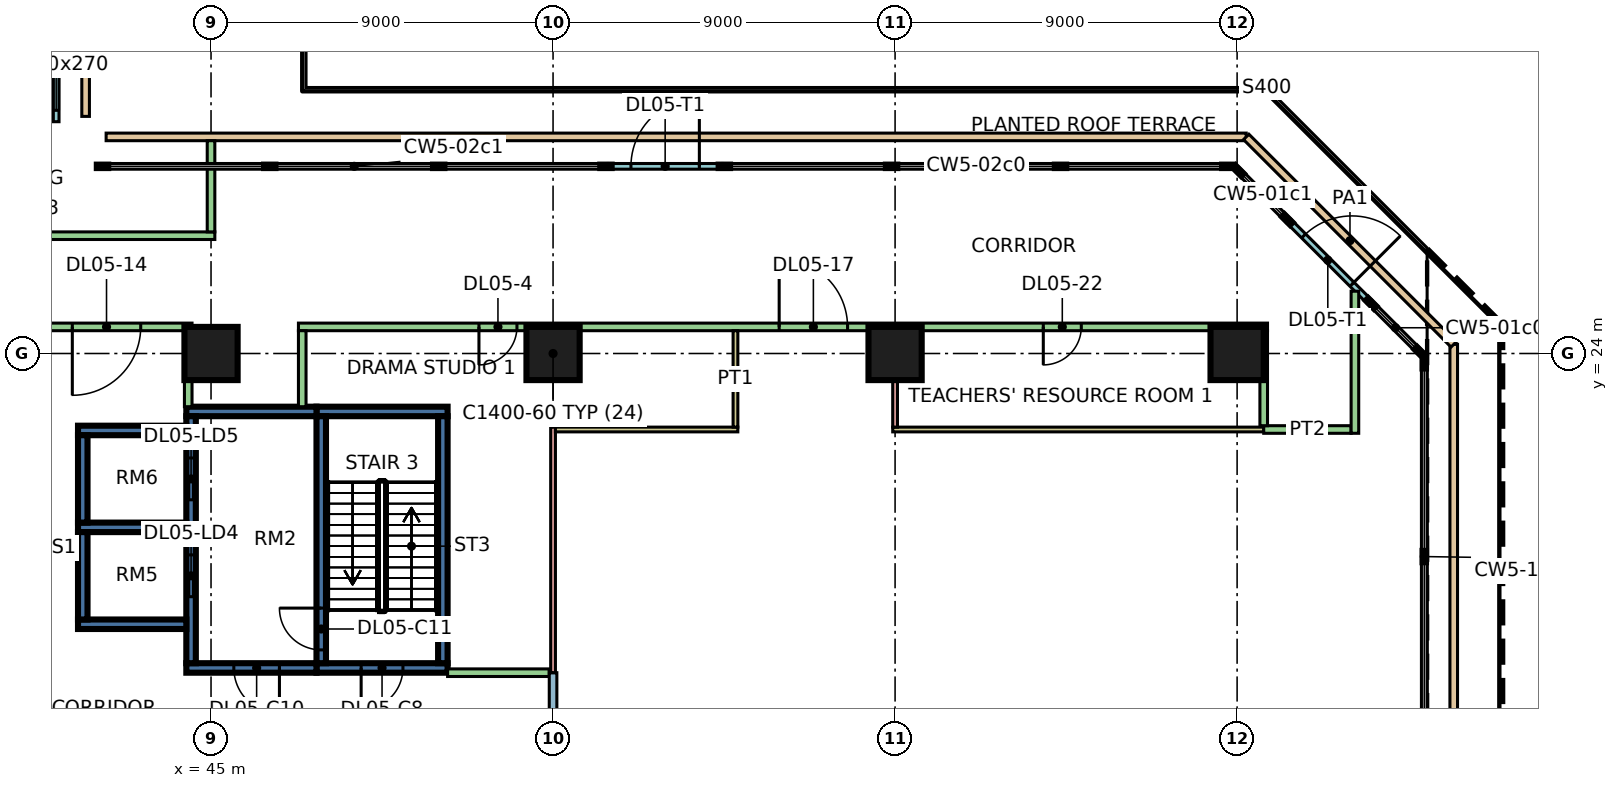
"""IFC4 building model, lengths in metres.
Left out: names, types, materials, properties, quantities, classifications, styles, units other than length and angle.
Written with IfcOpenShell. Run it as: python <this file> out.ifc"""

import sys

from ifc_helpers import new_model, si_unit, direction, frame, frame_2d, origin, origin_2d, place, context, subcontext, project, spatial, rectangle, extrude, element, fill, save


model = new_model("IFC4")
c1 = context("Model", 3, precision=1e-05, world=origin(), true_north=direction((0.0, 1.0)))
c2 = subcontext(c1, "Body", "Model", "MODEL_VIEW")
j1 = project(units=[si_unit("LENGTHUNIT", "METRE"), si_unit("PLANEANGLEUNIT", "RADIAN")], contexts=[c1])
p1 = place(None, origin())
s1 = spatial("IfcSite", under=j1, at=p1, CompositionType="ELEMENT")
p2 = place(p1, origin())
s2 = spatial("IfcBuilding", under=s1, at=p2, CompositionType="ELEMENT")
p3 = place(p2, frame((0.0, 0.0, 26.4)))
s3 = spatial("IfcBuildingStorey", under=s2, at=p3, CompositionType="ELEMENT", Elevation=26.4)
for number, where, z_axis, x_axis in (
    (1, (45.0, 24.0, 0.0), (0.0, 0.0, 1.0), (1.0, 0.0, 0.0)),
    (2, (54.0, 24.0, 0.0), (0.0, 0.0, 1.0), (1.0, 0.0, 0.0)),
    (3, (63.0, 24.0, 0.0), (0.0, 0.0, 1.0), (1.0, 0.0, 0.0)),
    (4, (72.0, 24.0, 0.0), (0.0, 0.0, 1.0), (1.0, 0.0, 0.0)),
):
    element("IfcColumn", number, at=place(p3, frame(where, z_axis=z_axis, x_axis=x_axis)), inside=s3, PredefinedType="COLUMN", context=c2, shape_type="SweptSolid", body=[
        extrude(rectangle(XDim=1.4, YDim=1.4, at=origin_2d()), origin(), (0.0, 0.0, 1.0), 9.0),
    ])
p4 = place(p3, frame((47.775, 15.725, 0.0), z_axis=(0.0, 0.0, 1.0), x_axis=(1.0, 0.0, 0.0)))
e5 = element("IfcWall", 5, at=p4, inside=s3, PredefinedType="SHEAR", context=c2, shape_type="SweptSolid", body=[
    extrude(rectangle(XDim=3.45, YDim=0.25, at=frame_2d((1.725, 0.0))), origin(), (0.0, 0.0, 1.0), 9.0),
])
p5 = place(p4, frame((1.175, 0.0, 0.0)))
e6 = element("IfcOpeningElement", 6, at=p5, cuts=e5, PredefinedType="OPENING", context=c2, shape_type="SweptSolid", body=[
    extrude(rectangle(XDim=1.1, YDim=2.2, at=frame_2d((0.55, 1.1))), frame((0.0, 0.135, 0.0), z_axis=(0.0, -1.0, 0.0), x_axis=(1.0, 0.0, 0.0)), (0.0, 0.0, 1.0), 0.27),
])
p6 = place(p3, frame((47.775, 22.475, 0.0), z_axis=(0.0, 0.0, 1.0), x_axis=(1.0, 0.0, 0.0)))
e7 = element("IfcWall", 7, at=p6, inside=s3, PredefinedType="SHEAR", context=c2, shape_type="SweptSolid", body=[
    extrude(rectangle(XDim=3.45, YDim=0.25, at=frame_2d((1.725, 0.0))), origin(), (0.0, 0.0, 1.0), 9.0),
])
p7 = place(p3, frame((47.9, 15.85, 0.0), z_axis=(0.0, 0.0, 1.0), x_axis=(0.0, 1.0, 0.0)))
e8 = element("IfcWall", 8, at=p7, inside=s3, PredefinedType="SHEAR", context=c2, shape_type="SweptSolid", body=[
    extrude(rectangle(XDim=6.5, YDim=0.25, at=frame_2d((3.25, 0.0))), origin(), (0.0, 0.0, 1.0), 9.0),
])
p8 = place(p7, frame((0.35, 0.0, 0.0)))
e9 = element("IfcOpeningElement", 9, at=p8, cuts=e8, PredefinedType="OPENING", context=c2, shape_type="SweptSolid", body=[
    extrude(rectangle(XDim=1.1, YDim=2.2, at=frame_2d((0.55, 1.1))), frame((0.0, 0.135, 0.0), z_axis=(0.0, -1.0, 0.0), x_axis=(1.0, 0.0, 0.0)), (0.0, 0.0, 1.0), 0.27),
])
p9 = place(p3, frame((51.1, 15.85, 0.0), z_axis=(0.0, 0.0, 1.0), x_axis=(0.0, 1.0, 0.0)))
e10 = element("IfcWall", 10, at=p9, inside=s3, PredefinedType="SHEAR", context=c2, shape_type="SweptSolid", body=[
    extrude(rectangle(XDim=6.5, YDim=0.25, at=frame_2d((3.25, 0.0))), origin(), (0.0, 0.0, 1.0), 9.0),
])
p10 = place(p3, frame((44.35, 15.725, 0.0), z_axis=(0.0, 0.0, 1.0), x_axis=(1.0, 0.0, 0.0)))
e11 = element("IfcWall", 11, at=p10, inside=s3, PredefinedType="SHEAR", context=c2, shape_type="SweptSolid", body=[
    extrude(rectangle(XDim=3.425, YDim=0.25, at=frame_2d((1.712, 0.0))), origin(), (0.0, 0.0, 1.0), 9.0),
])
p11 = place(p10, frame((1.25, 0.0, 0.0)))
e12 = element("IfcOpeningElement", 12, at=p11, cuts=e11, PredefinedType="OPENING", context=c2, shape_type="SweptSolid", body=[
    extrude(rectangle(XDim=1.2, YDim=2.2, at=frame_2d((0.6, 1.1))), frame((0.0, 0.135, 0.0), z_axis=(0.0, -1.0, 0.0), x_axis=(1.0, 0.0, 0.0)), (0.0, 0.0, 1.0), 0.27),
])
p12 = place(p3, frame((44.35, 22.475, 0.0), z_axis=(0.0, 0.0, 1.0), x_axis=(1.0, 0.0, 0.0)))
e13 = element("IfcWall", 13, at=p12, inside=s3, PredefinedType="SHEAR", context=c2, shape_type="SweptSolid", body=[
    extrude(rectangle(XDim=3.425, YDim=0.25, at=frame_2d((1.712, 0.0))), origin(), (0.0, 0.0, 1.0), 9.0),
])
p13 = place(p3, frame((44.475, 15.85, 0.0), z_axis=(0.0, 0.0, 1.0), x_axis=(0.0, 1.0, 0.0)))
e14 = element("IfcWall", 14, at=p13, inside=s3, PredefinedType="SHEAR", context=c2, shape_type="SweptSolid", body=[
    extrude(rectangle(XDim=6.5, YDim=0.25, at=frame_2d((3.25, 0.0))), origin(), (0.0, 0.0, 1.0), 9.0),
])
p14 = place(p13, frame((1.75, 0.0, 0.0)))
e15 = element("IfcOpeningElement", 15, at=p14, cuts=e14, PredefinedType="OPENING", context=c2, shape_type="SweptSolid", body=[
    extrude(rectangle(XDim=1.1, YDim=2.2, at=frame_2d((0.55, 1.1))), frame((0.0, 0.135, 0.0), z_axis=(0.0, -1.0, 0.0), x_axis=(1.0, 0.0, 0.0)), (0.0, 0.0, 1.0), 0.27),
])
p15 = place(p13, frame((4.3, 0.0, 0.0)))
e16 = element("IfcOpeningElement", 16, at=p15, cuts=e14, PredefinedType="OPENING", context=c2, shape_type="SweptSolid", body=[
    extrude(rectangle(XDim=1.1, YDim=2.2, at=frame_2d((0.55, 1.1))), frame((0.0, 0.135, 0.0), z_axis=(0.0, -1.0, 0.0), x_axis=(1.0, 0.0, 0.0)), (0.0, 0.0, 1.0), 0.27),
])
for number, where, z_axis, x_axis in (
    (17, (41.5, 16.875, 0.0), (0.0, 0.0, 1.0), (1.0, 0.0, 0.0)),
    (18, (41.5, 19.425, 0.0), (0.0, 0.0, 1.0), (1.0, 0.0, 0.0)),
    (19, (41.5, 21.975, 0.0), (0.0, 0.0, 1.0), (1.0, 0.0, 0.0)),
):
    element("IfcWall", number, at=place(p3, frame(where, z_axis=z_axis, x_axis=x_axis)), inside=s3, PredefinedType="SHEAR", context=c2, shape_type="SweptSolid", body=[
        extrude(rectangle(XDim=2.85, YDim=0.25, at=frame_2d((1.425, 0.0))), origin(), (0.0, 0.0, 1.0), 9.0),
    ])
for number, where, z_axis, x_axis in (
    (20, (41.625, 17.0, 0.0), (0.0, 0.0, 1.0), (0.0, 1.0, 0.0)),
    (21, (41.625, 19.55, 0.0), (0.0, 0.0, 1.0), (0.0, 1.0, 0.0)),
):
    element("IfcWall", number, at=place(p3, frame(where, z_axis=z_axis, x_axis=x_axis)), inside=s3, PredefinedType="SHEAR", context=c2, shape_type="SweptSolid", body=[
        extrude(rectangle(XDim=2.3, YDim=0.25, at=frame_2d((1.15, 0.0))), origin(), (0.0, 0.0, 1.0), 9.0),
    ])
p16 = place(p3, frame((75.482, 25.361, 0.0), z_axis=(0.0, 0.0, 1.0), x_axis=(-0.707106781187, 0.707106781187, 0.0)))
e22 = element("IfcWall", 22, at=p16, inside=s3, PredefinedType="SOLIDWALL", context=c2, shape_type="SweptSolid", body=[
    extrude(rectangle(XDim=3.0, YDim=0.15, at=frame_2d((1.5, 0.0))), origin(), (0.0, 0.0, 1.0), 8.45),
])
p17 = place(p16, frame((0.65, 0.0, 0.0)))
e23 = element("IfcOpeningElement", 23, at=p17, cuts=e22, PredefinedType="OPENING", context=c2, shape_type="SweptSolid", body=[
    extrude(rectangle(XDim=1.8, YDim=2.4, at=frame_2d((0.9, 1.2))), frame((0.0, 0.085, 0.0), z_axis=(0.0, -1.0, 0.0), x_axis=(1.0, 0.0, 0.0)), (0.0, 0.0, 1.0), 0.17),
])
p18 = place(p3, frame((58.45, 28.925, 0.0), z_axis=(0.0, 0.0, 1.0), x_axis=(-1.0, 0.0, 0.0)))
e24 = element("IfcWall", 24, at=p18, inside=s3, PredefinedType="SOLIDWALL", context=c2, shape_type="SweptSolid", body=[
    extrude(rectangle(XDim=3.0, YDim=0.15, at=frame_2d((1.5, 0.0))), origin(), (0.0, 0.0, 1.0), 8.45),
])
p19 = place(p18, frame((0.6, 0.0, 0.0)))
e25 = element("IfcOpeningElement", 25, at=p19, cuts=e24, PredefinedType="OPENING", context=c2, shape_type="SweptSolid", body=[
    extrude(rectangle(XDim=1.8, YDim=2.4, at=frame_2d((0.9, 1.2))), frame((0.0, 0.085, 0.0), z_axis=(0.0, -1.0, 0.0), x_axis=(1.0, 0.0, 0.0)), (0.0, 0.0, 1.0), 0.17),
])
p20 = place(p3, frame((40.925, 30.1, 0.0), z_axis=(0.0, 0.0, 1.0), x_axis=(0.0, 1.0, 0.0)))
e26 = element("IfcWall", 26, at=p20, inside=s3, PredefinedType="SOLIDWALL", context=c2, shape_type="SweptSolid", body=[
    extrude(rectangle(XDim=3.3, YDim=0.15, at=frame_2d((1.65, 0.0))), origin(), (0.0, 0.0, 1.0), 8.45),
])
p21 = place(p20, frame((0.3, 0.0, 0.9)))
e27 = element("IfcOpeningElement", 27, at=p21, cuts=e26, PredefinedType="OPENING", context=c2, shape_type="SweptSolid", body=[
    extrude(rectangle(XDim=2.4, YDim=2.7, at=frame_2d((1.2, 1.35))), frame((0.0, 0.085, 0.0), z_axis=(0.0, -1.0, 0.0), x_axis=(1.0, 0.0, 0.0)), (0.0, 0.0, 1.0), 0.17),
])
p22 = place(p3, frame((77.7, 24.24, 0.0), z_axis=(0.0, 0.0, 1.0), x_axis=(0.0, -1.0, 0.0)))
e28 = element("IfcWall", 28, at=p22, inside=s3, PredefinedType="PARAPET", context=c2, shape_type="SweptSolid", body=[
    extrude(rectangle(XDim=24.479, YDim=0.2, at=frame_2d((12.24, 0.0))), origin(), (0.0, 0.0, 1.0), 0.5),
])
p23 = place(p3, frame((41.7, 34.64, 0.0), z_axis=(0.0, 0.0, 1.0), x_axis=(0.0, -1.0, 0.0)))
e29 = element("IfcWall", 29, at=p23, inside=s3, PredefinedType="PARAPET", context=c2, shape_type="SweptSolid", body=[
    extrude(rectangle(XDim=4.4, YDim=0.2, at=frame_2d((2.2, 0.0))), origin(), (0.0, 0.0, 1.0), 0.5),
])
p24 = place(p3, frame((42.24, 29.7, 0.0), z_axis=(0.0, 0.0, 1.0), x_axis=(1.0, 0.0, 0.0)))
e30 = element("IfcWall", 30, at=p24, inside=s3, PredefinedType="PARAPET", context=c2, shape_type="SweptSolid", body=[
    extrude(rectangle(XDim=30.0, YDim=0.2, at=frame_2d((15.0, 0.0))), origin(), (0.0, 0.0, 1.0), 0.5),
])
p25 = place(p3, frame((72.24, 29.7, 0.0), z_axis=(0.0, 0.0, 1.0), x_axis=(0.707106781187, -0.707106781187, 0.0)))
e31 = element("IfcWall", 31, at=p25, inside=s3, PredefinedType="PARAPET", context=c2, shape_type="SweptSolid", body=[
    extrude(rectangle(XDim=7.722, YDim=0.2, at=frame_2d((3.861, 0.0))), origin(), (0.0, 0.0, 1.0), 0.5),
])
p26 = place(p3, frame((38.5, 27.1, 0.0), z_axis=(0.0, 0.0, 1.0), x_axis=(1.0, 0.0, 0.0)))
e32 = element("IfcWall", 32, at=p26, inside=s3, PredefinedType="PARTITIONING", context=c2, shape_type="SweptSolid", body=[
    extrude(rectangle(XDim=6.6, YDim=0.2, at=frame_2d((3.3, 0.0))), origin(), (0.0, 0.0, 1.0), 8.45),
])
p27 = place(p3, frame((40.2, 24.7, 0.0), z_axis=(0.0, 0.0, 1.0), x_axis=(1.0, 0.0, 0.0)))
e33 = element("IfcWall", 33, at=p27, inside=s3, PredefinedType="PARTITIONING", context=c2, shape_type="SweptSolid", body=[
    extrude(rectangle(XDim=4.3, YDim=0.2, at=frame_2d((2.15, 0.0))), origin(), (0.0, 0.0, 1.0), 8.45),
])
p28 = place(p27, frame((1.15, 0.0, 0.0)))
e34 = element("IfcOpeningElement", 34, at=p28, cuts=e33, PredefinedType="OPENING", context=c2, shape_type="SweptSolid", body=[
    extrude(rectangle(XDim=1.8, YDim=2.1, at=frame_2d((0.9, 1.05))), frame((0.0, 0.11, 0.0), z_axis=(0.0, -1.0, 0.0), x_axis=(1.0, 0.0, 0.0)), (0.0, 0.0, 1.0), 0.22),
])
p29 = place(p3, frame((44.4, 22.6, 0.0), z_axis=(0.0, 0.0, 1.0), x_axis=(0.0, 1.0, 0.0)))
e35 = element("IfcWall", 35, at=p29, inside=s3, PredefinedType="PARTITIONING", context=c2, shape_type="SweptSolid", body=[
    extrude(rectangle(XDim=2.0, YDim=0.2, at=frame_2d((1.0, 0.0))), origin(), (0.0, 0.0, 1.0), 8.45),
])
p30 = place(p3, frame((45.0, 27.2, 0.0), z_axis=(0.0, 0.0, 1.0), x_axis=(0.0, 1.0, 0.0)))
e36 = element("IfcWall", 36, at=p30, inside=s3, PredefinedType="PARTITIONING", context=c2, shape_type="SweptSolid", body=[
    extrude(rectangle(XDim=2.4, YDim=0.2, at=frame_2d((1.2, 0.0))), origin(), (0.0, 0.0, 1.0), 8.45),
])
p31 = place(p3, frame((47.3, 24.7, 0.0), z_axis=(0.0, 0.0, 1.0), x_axis=(1.0, 0.0, 0.0)))
e37 = element("IfcWall", 37, at=p31, inside=s3, PredefinedType="PARTITIONING", context=c2, shape_type="SweptSolid", body=[
    extrude(rectangle(XDim=25.5, YDim=0.2, at=frame_2d((12.75, 0.0))), origin(), (0.0, 0.0, 1.0), 8.45),
])
p32 = place(p31, frame((4.75, 0.0, 0.0)))
e38 = element("IfcOpeningElement", 38, at=p32, cuts=e37, PredefinedType="OPENING", context=c2, shape_type="SweptSolid", body=[
    extrude(rectangle(XDim=1.0, YDim=2.1, at=frame_2d((0.5, 1.05))), frame((0.0, 0.11, 0.0), z_axis=(0.0, -1.0, 0.0), x_axis=(1.0, 0.0, 0.0)), (0.0, 0.0, 1.0), 0.22),
])
p33 = place(p31, frame((12.65, 0.0, 0.0)))
e39 = element("IfcOpeningElement", 39, at=p33, cuts=e37, PredefinedType="OPENING", context=c2, shape_type="SweptSolid", body=[
    extrude(rectangle(XDim=1.8, YDim=2.1, at=frame_2d((0.9, 1.05))), frame((0.0, 0.11, 0.0), z_axis=(0.0, -1.0, 0.0), x_axis=(1.0, 0.0, 0.0)), (0.0, 0.0, 1.0), 0.22),
])
p34 = place(p31, frame((19.6, 0.0, 0.0)))
e40 = element("IfcOpeningElement", 40, at=p34, cuts=e37, PredefinedType="OPENING", context=c2, shape_type="SweptSolid", body=[
    extrude(rectangle(XDim=1.0, YDim=2.1, at=frame_2d((0.5, 1.05))), frame((0.0, 0.11, 0.0), z_axis=(0.0, -1.0, 0.0), x_axis=(1.0, 0.0, 0.0)), (0.0, 0.0, 1.0), 0.22),
])
p35 = place(p3, frame((47.4, 22.6, 0.0), z_axis=(0.0, 0.0, 1.0), x_axis=(0.0, 1.0, 0.0)))
e41 = element("IfcWall", 41, at=p35, inside=s3, PredefinedType="PARTITIONING", context=c2, shape_type="SweptSolid", body=[
    extrude(rectangle(XDim=2.0, YDim=0.2, at=frame_2d((1.0, 0.0))), origin(), (0.0, 0.0, 1.0), 8.45),
])
p36 = place(p3, frame((51.225, 15.6, 0.0), z_axis=(0.0, 0.0, 1.0), x_axis=(1.0, 0.0, 0.0)))
e42 = element("IfcWall", 42, at=p36, inside=s3, PredefinedType="PARTITIONING", context=c2, shape_type="SweptSolid", body=[
    extrude(rectangle(XDim=2.675, YDim=0.2, at=frame_2d((1.337, 0.0))), origin(), (0.0, 0.0, 1.0), 8.45),
])
p37 = place(p3, frame((54.0, 12.6, 0.0), z_axis=(0.0, 0.0, 1.0), x_axis=(0.0, 1.0, 0.0)))
e43 = element("IfcWall", 43, at=p37, inside=s3, PredefinedType="PARTITIONING", context=c2, shape_type="SweptSolid", body=[
    extrude(rectangle(XDim=3.0, YDim=0.2, at=frame_2d((1.5, 0.0))), origin(), (0.0, 0.0, 1.0), 6.55),
])
p38 = place(p3, frame((54.0, 15.6, 0.0), z_axis=(0.0, 0.0, 1.0), x_axis=(0.0, 1.0, 0.0)))
e44 = element("IfcWall", 44, at=p38, inside=s3, PredefinedType="PARTITIONING", context=c2, shape_type="SweptSolid", body=[
    extrude(rectangle(XDim=6.462, YDim=0.125, at=frame_2d((3.231, 0.0))), origin(), (0.0, 0.0, 1.0), 6.55),
])
p39 = place(p3, frame((54.062, 22.0, 0.0), z_axis=(0.0, 0.0, 1.0), x_axis=(1.0, 0.0, 0.0)))
e45 = element("IfcWall", 45, at=p39, inside=s3, PredefinedType="PARTITIONING", context=c2, shape_type="SweptSolid", body=[
    extrude(rectangle(XDim=4.8, YDim=0.125, at=frame_2d((2.4, 0.0))), origin(), (0.0, 0.0, 1.0), 8.45),
])
p40 = place(p3, frame((58.8, 22.062, 0.0), z_axis=(0.0, 0.0, 1.0), x_axis=(0.0, 1.0, 0.0)))
e46 = element("IfcWall", 46, at=p40, inside=s3, PredefinedType="PARTITIONING", context=c2, shape_type="SweptSolid", body=[
    extrude(rectangle(XDim=2.538, YDim=0.125, at=frame_2d((1.269, 0.0))), origin(), (0.0, 0.0, 1.0), 8.45),
])
p41 = place(p3, frame((62.938, 22.0, 0.0), z_axis=(0.0, 0.0, 1.0), x_axis=(1.0, 0.0, 0.0)))
e47 = element("IfcWall", 47, at=p41, inside=s3, PredefinedType="PARTITIONING", context=c2, shape_type="SweptSolid", body=[
    extrude(rectangle(XDim=9.762, YDim=0.125, at=frame_2d((4.881, 0.0))), origin(), (0.0, 0.0, 1.0), 8.45),
])
p42 = place(p3, frame((63.0, 22.062, 0.0), z_axis=(0.0, 0.0, 1.0), x_axis=(0.0, 1.0, 0.0)))
e48 = element("IfcWall", 48, at=p42, inside=s3, PredefinedType="PARTITIONING", context=c2, shape_type="SweptSolid", body=[
    extrude(rectangle(XDim=2.538, YDim=0.125, at=frame_2d((1.269, 0.0))), origin(), (0.0, 0.0, 1.0), 6.55),
])
p43 = place(p3, frame((72.7, 22.0, 0.0), z_axis=(0.0, 0.0, 1.0), x_axis=(1.0, 0.0, 0.0)))
e49 = element("IfcWall", 49, at=p43, inside=s3, PredefinedType="PARTITIONING", context=c2, shape_type="SweptSolid", body=[
    extrude(rectangle(XDim=2.3, YDim=0.2, at=frame_2d((1.15, 0.0))), origin(), (0.0, 0.0, 1.0), 8.45),
])
p44 = place(p3, frame((72.7, 22.1, 0.0), z_axis=(0.0, 0.0, 1.0), x_axis=(0.0, 1.0, 0.0)))
e50 = element("IfcWall", 50, at=p44, inside=s3, PredefinedType="PARTITIONING", context=c2, shape_type="SweptSolid", body=[
    extrude(rectangle(XDim=2.5, YDim=0.2, at=frame_2d((1.25, 0.0))), origin(), (0.0, 0.0, 1.0), 8.45),
])
p45 = place(p3, frame((75.1, 21.9, 0.0), z_axis=(0.0, 0.0, 1.0), x_axis=(0.0, 1.0, 0.0)))
e51 = element("IfcWall", 51, at=p45, inside=s3, PredefinedType="PARTITIONING", context=c2, shape_type="SweptSolid", body=[
    extrude(rectangle(XDim=3.739, YDim=0.2, at=frame_2d((1.87, 0.0))), origin(), (0.0, 0.0, 1.0), 8.45),
])
p46 = place(p17, frame((1.8, 0.0, 0.0), z_axis=(0.0, 0.0, 1.0), x_axis=(-1.0, 0.0, 0.0)))
e52 = element("IfcDoor", 52, at=p46, inside=s3, OperationType="DOUBLE_DOOR_SINGLE_SWING", PredefinedType="DOOR", context=c2, shape_type="SweptSolid", body=[
    extrude(rectangle(XDim=1.8, YDim=2.4, at=frame_2d((0.9, 1.2))), frame((0.0, 0.025, 0.0), z_axis=(0.0, -1.0, 0.0), x_axis=(1.0, 0.0, 0.0)), (0.0, 0.0, 1.0), 0.05),
])
fill(e23, e52)
p47 = place(p19, frame((1.8, 0.0, 0.0), z_axis=(0.0, 0.0, 1.0), x_axis=(-1.0, 0.0, 0.0)))
e53 = element("IfcDoor", 53, at=p47, inside=s3, OperationType="DOUBLE_DOOR_SINGLE_SWING", PredefinedType="DOOR", context=c2, shape_type="SweptSolid", body=[
    extrude(rectangle(XDim=1.8, YDim=2.4, at=frame_2d((0.9, 1.2))), frame((0.0, 0.025, 0.0), z_axis=(0.0, -1.0, 0.0), x_axis=(1.0, 0.0, 0.0)), (0.0, 0.0, 1.0), 0.05),
])
fill(e25, e53)
p48 = place(p21, origin())
e54 = element("IfcWindow", 54, at=p48, inside=s3, PartitioningType="SINGLE_PANEL", PredefinedType="WINDOW", context=c2, shape_type="SweptSolid", body=[
    extrude(rectangle(XDim=2.4, YDim=2.7, at=frame_2d((1.2, 1.35))), frame((0.0, 0.03, 0.0), z_axis=(0.0, -1.0, 0.0), x_axis=(1.0, 0.0, 0.0)), (0.0, 0.0, 1.0), 0.06),
])
fill(e27, e54)
p49 = place(p5, frame((1.1, 0.0, 0.0), z_axis=(0.0, 0.0, 1.0), x_axis=(-1.0, 0.0, 0.0)))
e55 = element("IfcDoor", 55, at=p49, inside=s3, OperationType="SINGLE_SWING_LEFT", PredefinedType="DOOR", context=c2, shape_type="SweptSolid", body=[
    extrude(rectangle(XDim=1.1, YDim=2.2, at=frame_2d((0.55, 1.1))), frame((0.0, 0.025, 0.0), z_axis=(0.0, -1.0, 0.0), x_axis=(1.0, 0.0, 0.0)), (0.0, 0.0, 1.0), 0.05),
])
fill(e6, e55)
p50 = place(p11, origin())
e56 = element("IfcDoor", 56, at=p50, inside=s3, OperationType="SINGLE_SWING_RIGHT", PredefinedType="DOOR", context=c2, shape_type="SweptSolid", body=[
    extrude(rectangle(XDim=1.2, YDim=2.2, at=frame_2d((0.6, 1.1))), frame((0.0, 0.025, 0.0), z_axis=(0.0, -1.0, 0.0), x_axis=(1.0, 0.0, 0.0)), (0.0, 0.0, 1.0), 0.05),
])
fill(e12, e56)
p51 = place(p8, frame((1.1, 0.0, 0.0), z_axis=(0.0, 0.0, 1.0), x_axis=(-1.0, 0.0, 0.0)))
e57 = element("IfcDoor", 57, at=p51, inside=s3, OperationType="SINGLE_SWING_RIGHT", PredefinedType="DOOR", context=c2, shape_type="SweptSolid", body=[
    extrude(rectangle(XDim=1.1, YDim=2.2, at=frame_2d((0.55, 1.1))), frame((0.0, 0.025, 0.0), z_axis=(0.0, -1.0, 0.0), x_axis=(1.0, 0.0, 0.0)), (0.0, 0.0, 1.0), 0.05),
])
fill(e9, e57)
p52 = place(p14, origin())
e58 = element("IfcDoor", 58, at=p52, inside=s3, OperationType="DOUBLE_DOOR_SLIDING", PredefinedType="DOOR", context=c2, shape_type="SweptSolid", body=[
    extrude(rectangle(XDim=1.1, YDim=2.2, at=frame_2d((0.55, 1.1))), frame((0.0, 0.025, 0.0), z_axis=(0.0, -1.0, 0.0), x_axis=(1.0, 0.0, 0.0)), (0.0, 0.0, 1.0), 0.05),
])
fill(e15, e58)
p53 = place(p15, origin())
e59 = element("IfcDoor", 59, at=p53, inside=s3, OperationType="DOUBLE_DOOR_SLIDING", PredefinedType="DOOR", context=c2, shape_type="SweptSolid", body=[
    extrude(rectangle(XDim=1.1, YDim=2.2, at=frame_2d((0.55, 1.1))), frame((0.0, 0.025, 0.0), z_axis=(0.0, -1.0, 0.0), x_axis=(1.0, 0.0, 0.0)), (0.0, 0.0, 1.0), 0.05),
])
fill(e16, e59)
p54 = place(p32, frame((1.0, 0.0, 0.0), z_axis=(0.0, 0.0, 1.0), x_axis=(-1.0, 0.0, 0.0)))
e60 = element("IfcDoor", 60, at=p54, inside=s3, OperationType="SINGLE_SWING_LEFT", PredefinedType="DOOR", context=c2, shape_type="SweptSolid", body=[
    extrude(rectangle(XDim=1.0, YDim=2.1, at=frame_2d((0.5, 1.05))), frame((0.0, 0.025, 0.0), z_axis=(0.0, -1.0, 0.0), x_axis=(1.0, 0.0, 0.0)), (0.0, 0.0, 1.0), 0.05),
])
fill(e38, e60)
p55 = place(p28, frame((1.8, 0.0, 0.0), z_axis=(0.0, 0.0, 1.0), x_axis=(-1.0, 0.0, 0.0)))
e61 = element("IfcDoor", 61, at=p55, inside=s3, OperationType="DOUBLE_DOOR_SINGLE_SWING", PredefinedType="DOOR", context=c2, shape_type="SweptSolid", body=[
    extrude(rectangle(XDim=1.8, YDim=2.1, at=frame_2d((0.9, 1.05))), frame((0.0, 0.025, 0.0), z_axis=(0.0, -1.0, 0.0), x_axis=(1.0, 0.0, 0.0)), (0.0, 0.0, 1.0), 0.05),
])
fill(e34, e61)
p56 = place(p33, origin())
e62 = element("IfcDoor", 62, at=p56, inside=s3, OperationType="DOUBLE_DOOR_SINGLE_SWING", PredefinedType="DOOR", context=c2, shape_type="SweptSolid", body=[
    extrude(rectangle(XDim=1.8, YDim=2.1, at=frame_2d((0.9, 1.05))), frame((0.0, 0.025, 0.0), z_axis=(0.0, -1.0, 0.0), x_axis=(1.0, 0.0, 0.0)), (0.0, 0.0, 1.0), 0.05),
])
fill(e39, e62)
p57 = place(p34, frame((1.0, 0.0, 0.0), z_axis=(0.0, 0.0, 1.0), x_axis=(-1.0, 0.0, 0.0)))
e63 = element("IfcDoor", 63, at=p57, inside=s3, OperationType="SINGLE_SWING_LEFT", PredefinedType="DOOR", context=c2, shape_type="SweptSolid", body=[
    extrude(rectangle(XDim=1.0, YDim=2.1, at=frame_2d((0.5, 1.05))), frame((0.0, 0.025, 0.0), z_axis=(0.0, -1.0, 0.0), x_axis=(1.0, 0.0, 0.0)), (0.0, 0.0, 1.0), 0.05),
])
fill(e40, e63)
save(model, sys.argv[1])
